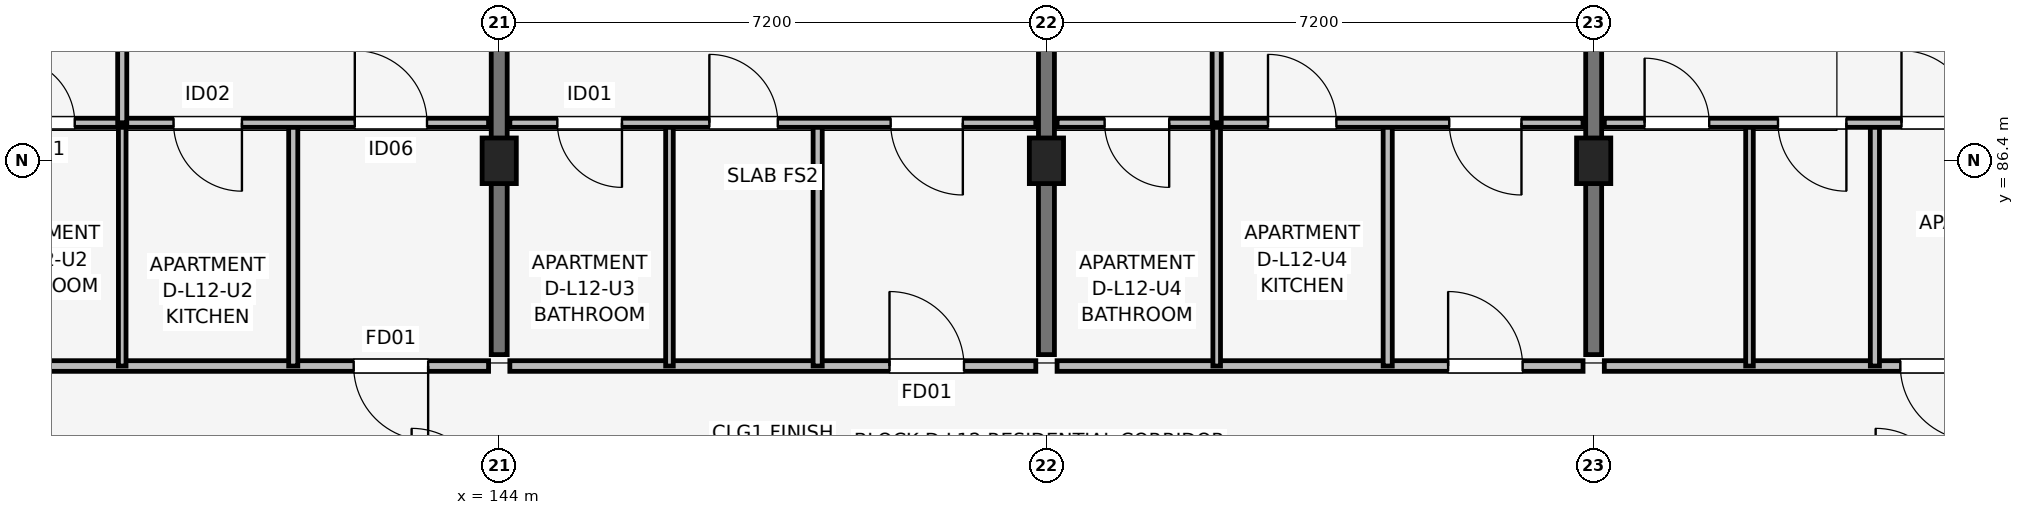
"""IFC4 building model, lengths in metres.
Left out: names, types, materials, properties, quantities, classifications, styles, units other than length and angle.
Written with IfcOpenShell. Run it as: python <this file> out.ifc"""

import sys

from ifc_helpers import new_model, si_unit, direction, frame, frame_2d, origin, origin_2d, place, context, subcontext, project, spatial, rectangle, extrude, element, fill, save


model = new_model("IFC4")
c1 = context("Model", 3, precision=1e-05, world=origin(), true_north=direction((0.0, 1.0)))
c2 = subcontext(c1, "Body", "Model", "MODEL_VIEW")
j1 = project(units=[si_unit("LENGTHUNIT", "METRE"), si_unit("PLANEANGLEUNIT", "RADIAN")], contexts=[c1])
p1 = place(None, origin())
s1 = spatial("IfcSite", under=j1, at=p1, CompositionType="ELEMENT")
p2 = place(p1, origin())
s2 = spatial("IfcBuilding", under=s1, at=p2, CompositionType="ELEMENT")
p3 = place(p2, frame((0.0, 0.0, 40.2)))
s3 = spatial("IfcBuildingStorey", under=s2, at=p3, CompositionType="ELEMENT", Elevation=40.2)
for number, where, z_axis, x_axis in (
    (1, (144.0, 86.4, 0.0), (0.0, 0.0, 1.0), (1.0, 0.0, 0.0)),
    (2, (151.2, 86.4, 0.0), (0.0, 0.0, 1.0), (1.0, 0.0, 0.0)),
    (3, (158.4, 86.4, 0.0), (0.0, 0.0, 1.0), (1.0, 0.0, 0.0)),
):
    element("IfcColumn", number, at=place(p3, frame(where, z_axis=z_axis, x_axis=x_axis)), inside=s3, PredefinedType="COLUMN", context=c2, shape_type="SweptSolid", body=[
        extrude(rectangle(XDim=0.45, YDim=0.6, at=origin_2d()), origin(), (0.0, 0.0, 1.0), 3.15),
    ])
for number, where, z_axis, x_axis in (
    (4, (144.0, 83.85, 0.0), (0.0, 0.0, 1.0), (0.0, 1.0, 0.0)),
    (5, (151.2, 83.85, 0.0), (0.0, 0.0, 1.0), (0.0, 1.0, 0.0)),
    (6, (158.4, 83.85, 0.0), (0.0, 0.0, 1.0), (0.0, 1.0, 0.0)),
):
    element("IfcWall", number, at=place(p3, frame(where, z_axis=z_axis, x_axis=x_axis)), inside=s3, PredefinedType="SHEAR", context=c2, shape_type="SweptSolid", body=[
        extrude(rectangle(XDim=9.4, YDim=0.21, at=frame_2d((4.7, 0.0))), origin(), (0.0, 0.0, 1.0), 3.15),
    ])
p4 = place(p3, frame((136.94, 83.7, 0.0), z_axis=(0.0, 0.0, 1.0), x_axis=(1.0, 0.0, 0.0)))
e7 = element("IfcWall", 7, at=p4, inside=s3, PredefinedType="PARTITIONING", context=c2, shape_type="SweptSolid", body=[
    extrude(rectangle(XDim=6.92, YDim=0.14, at=frame_2d((3.46, 0.0))), origin(), (0.0, 0.0, 1.0), 2.38),
])
p5 = place(p4, frame((6.125, 0.0, 0.0), z_axis=(0.0, 0.0, 1.0), x_axis=(-1.0, 0.0, 0.0)))
e8 = element("IfcOpeningElement", 8, at=p5, cuts=e7, PredefinedType="OPENING", context=c2, shape_type="SweptSolid", body=[
    extrude(rectangle(XDim=0.98, YDim=2.1, at=frame_2d((0.49, 1.05))), frame((0.0, 0.08, 0.0), z_axis=(0.0, -1.0, 0.0), x_axis=(1.0, 0.0, 0.0)), (0.0, 0.0, 1.0), 0.16),
])
p6 = place(p3, frame((139.04, 83.7, 0.0), z_axis=(0.0, 0.0, 1.0), x_axis=(0.0, 1.0, 0.0)))
e9 = element("IfcWall", 9, at=p6, inside=s3, PredefinedType="PARTITIONING", context=c2, shape_type="SweptSolid", body=[
    extrude(rectangle(XDim=3.2, YDim=0.1, at=frame_2d((1.6, 0.0))), origin(), (0.0, 0.0, 1.0), 2.38),
])
p7 = place(p3, frame((141.29, 83.7, 0.0), z_axis=(0.0, 0.0, 1.0), x_axis=(0.0, 1.0, 0.0)))
e10 = element("IfcWall", 10, at=p7, inside=s3, PredefinedType="PARTITIONING", context=c2, shape_type="SweptSolid", body=[
    extrude(rectangle(XDim=3.2, YDim=0.12, at=frame_2d((1.6, 0.0))), origin(), (0.0, 0.0, 1.0), 2.38),
])
p8 = place(p3, frame((136.94, 86.9, 0.0), z_axis=(0.0, 0.0, 1.0), x_axis=(1.0, 0.0, 0.0)))
e11 = element("IfcWall", 11, at=p8, inside=s3, PredefinedType="PARTITIONING", context=c2, shape_type="SweptSolid", body=[
    extrude(rectangle(XDim=6.92, YDim=0.12, at=frame_2d((3.46, 0.0))), origin(), (0.0, 0.0, 1.0), 2.38),
])
p9 = place(p8, frame((0.625, 0.0, 0.0)))
e12 = element("IfcOpeningElement", 12, at=p9, cuts=e11, PredefinedType="OPENING", context=c2, shape_type="SweptSolid", body=[
    extrude(rectangle(XDim=0.85, YDim=2.08, at=frame_2d((0.425, 1.04))), frame((0.0, 0.07, 0.0), z_axis=(0.0, -1.0, 0.0), x_axis=(1.0, 0.0, 0.0)), (0.0, 0.0, 1.0), 0.14),
])
p10 = place(p8, frame((3.675, 0.0, 0.0), z_axis=(0.0, 0.0, 1.0), x_axis=(-1.0, 0.0, 0.0)))
e13 = element("IfcOpeningElement", 13, at=p10, cuts=e11, PredefinedType="OPENING", context=c2, shape_type="SweptSolid", body=[
    extrude(rectangle(XDim=0.9, YDim=2.08, at=frame_2d((0.45, 1.04))), frame((0.0, 0.07, 0.0), z_axis=(0.0, -1.0, 0.0), x_axis=(1.0, 0.0, 0.0)), (0.0, 0.0, 1.0), 0.14),
])
p11 = place(p8, frame((5.16, 0.0, 0.0)))
e14 = element("IfcOpeningElement", 14, at=p11, cuts=e11, PredefinedType="OPENING", context=c2, shape_type="SweptSolid", body=[
    extrude(rectangle(XDim=0.95, YDim=2.08, at=frame_2d((0.475, 1.04))), frame((0.0, 0.07, 0.0), z_axis=(0.0, -1.0, 0.0), x_axis=(1.0, 0.0, 0.0)), (0.0, 0.0, 1.0), 0.14),
])
p12 = place(p3, frame((139.04, 86.9, 0.0), z_axis=(0.0, 0.0, 1.0), x_axis=(0.0, 1.0, 0.0)))
e15 = element("IfcWall", 15, at=p12, inside=s3, PredefinedType="PARTITIONING", context=c2, shape_type="SweptSolid", body=[
    extrude(rectangle(XDim=6.4, YDim=0.12, at=frame_2d((3.2, 0.0))), origin(), (0.0, 0.0, 1.0), 2.38),
])
p13 = place(p12, frame((3.65, 0.0, 0.0), z_axis=(0.0, 0.0, 1.0), x_axis=(-1.0, 0.0, 0.0)))
e16 = element("IfcOpeningElement", 16, at=p13, cuts=e15, PredefinedType="OPENING", context=c2, shape_type="SweptSolid", body=[
    extrude(rectangle(XDim=0.9, YDim=2.08, at=frame_2d((0.45, 1.04))), frame((0.0, 0.07, 0.0), z_axis=(0.0, -1.0, 0.0), x_axis=(1.0, 0.0, 0.0)), (0.0, 0.0, 1.0), 0.14),
])
p14 = place(p3, frame((144.14, 83.7, 0.0), z_axis=(0.0, 0.0, 1.0), x_axis=(1.0, 0.0, 0.0)))
e17 = element("IfcWall", 17, at=p14, inside=s3, PredefinedType="PARTITIONING", context=c2, shape_type="SweptSolid", body=[
    extrude(rectangle(XDim=6.92, YDim=0.14, at=frame_2d((3.46, 0.0))), origin(), (0.0, 0.0, 1.0), 2.38),
])
p15 = place(p14, frame((4.995, 0.0, 0.0)))
e18 = element("IfcOpeningElement", 18, at=p15, cuts=e17, PredefinedType="OPENING", context=c2, shape_type="SweptSolid", body=[
    extrude(rectangle(XDim=0.98, YDim=2.1, at=frame_2d((0.49, 1.05))), frame((0.0, 0.08, 0.0), z_axis=(0.0, -1.0, 0.0), x_axis=(1.0, 0.0, 0.0)), (0.0, 0.0, 1.0), 0.16),
])
p16 = place(p3, frame((146.24, 83.7, 0.0), z_axis=(0.0, 0.0, 1.0), x_axis=(0.0, 1.0, 0.0)))
e19 = element("IfcWall", 19, at=p16, inside=s3, PredefinedType="PARTITIONING", context=c2, shape_type="SweptSolid", body=[
    extrude(rectangle(XDim=3.2, YDim=0.1, at=frame_2d((1.6, 0.0))), origin(), (0.0, 0.0, 1.0), 2.38),
])
p17 = place(p3, frame((148.19, 83.7, 0.0), z_axis=(0.0, 0.0, 1.0), x_axis=(0.0, 1.0, 0.0)))
e20 = element("IfcWall", 20, at=p17, inside=s3, PredefinedType="PARTITIONING", context=c2, shape_type="SweptSolid", body=[
    extrude(rectangle(XDim=3.2, YDim=0.12, at=frame_2d((1.6, 0.0))), origin(), (0.0, 0.0, 1.0), 2.38),
])
p18 = place(p3, frame((144.14, 86.9, 0.0), z_axis=(0.0, 0.0, 1.0), x_axis=(1.0, 0.0, 0.0)))
e21 = element("IfcWall", 21, at=p18, inside=s3, PredefinedType="PARTITIONING", context=c2, shape_type="SweptSolid", body=[
    extrude(rectangle(XDim=6.92, YDim=0.12, at=frame_2d((3.46, 0.0))), origin(), (0.0, 0.0, 1.0), 2.38),
])
p19 = place(p18, frame((1.475, 0.0, 0.0), z_axis=(0.0, 0.0, 1.0), x_axis=(-1.0, 0.0, 0.0)))
e22 = element("IfcOpeningElement", 22, at=p19, cuts=e21, PredefinedType="OPENING", context=c2, shape_type="SweptSolid", body=[
    extrude(rectangle(XDim=0.85, YDim=2.08, at=frame_2d((0.425, 1.04))), frame((0.0, 0.07, 0.0), z_axis=(0.0, -1.0, 0.0), x_axis=(1.0, 0.0, 0.0)), (0.0, 0.0, 1.0), 0.14),
])
p20 = place(p18, frame((2.625, 0.0, 0.0)))
e23 = element("IfcOpeningElement", 23, at=p20, cuts=e21, PredefinedType="OPENING", context=c2, shape_type="SweptSolid", body=[
    extrude(rectangle(XDim=0.9, YDim=2.08, at=frame_2d((0.45, 1.04))), frame((0.0, 0.07, 0.0), z_axis=(0.0, -1.0, 0.0), x_axis=(1.0, 0.0, 0.0)), (0.0, 0.0, 1.0), 0.14),
])
p21 = place(p18, frame((5.96, 0.0, 0.0), z_axis=(0.0, 0.0, 1.0), x_axis=(-1.0, 0.0, 0.0)))
e24 = element("IfcOpeningElement", 24, at=p21, cuts=e21, PredefinedType="OPENING", context=c2, shape_type="SweptSolid", body=[
    extrude(rectangle(XDim=0.95, YDim=2.08, at=frame_2d((0.475, 1.04))), frame((0.0, 0.07, 0.0), z_axis=(0.0, -1.0, 0.0), x_axis=(1.0, 0.0, 0.0)), (0.0, 0.0, 1.0), 0.14),
])
p22 = place(p3, frame((151.34, 83.7, 0.0), z_axis=(0.0, 0.0, 1.0), x_axis=(1.0, 0.0, 0.0)))
e25 = element("IfcWall", 25, at=p22, inside=s3, PredefinedType="PARTITIONING", context=c2, shape_type="SweptSolid", body=[
    extrude(rectangle(XDim=6.92, YDim=0.14, at=frame_2d((3.46, 0.0))), origin(), (0.0, 0.0, 1.0), 2.38),
])
p23 = place(p22, frame((5.145, 0.0, 0.0)))
e26 = element("IfcOpeningElement", 26, at=p23, cuts=e25, PredefinedType="OPENING", context=c2, shape_type="SweptSolid", body=[
    extrude(rectangle(XDim=0.98, YDim=2.1, at=frame_2d((0.49, 1.05))), frame((0.0, 0.08, 0.0), z_axis=(0.0, -1.0, 0.0), x_axis=(1.0, 0.0, 0.0)), (0.0, 0.0, 1.0), 0.16),
])
p24 = place(p3, frame((153.44, 83.7, 0.0), z_axis=(0.0, 0.0, 1.0), x_axis=(0.0, 1.0, 0.0)))
e27 = element("IfcWall", 27, at=p24, inside=s3, PredefinedType="PARTITIONING", context=c2, shape_type="SweptSolid", body=[
    extrude(rectangle(XDim=3.2, YDim=0.1, at=frame_2d((1.6, 0.0))), origin(), (0.0, 0.0, 1.0), 2.38),
])
p25 = place(p3, frame((155.69, 83.7, 0.0), z_axis=(0.0, 0.0, 1.0), x_axis=(0.0, 1.0, 0.0)))
e28 = element("IfcWall", 28, at=p25, inside=s3, PredefinedType="PARTITIONING", context=c2, shape_type="SweptSolid", body=[
    extrude(rectangle(XDim=3.2, YDim=0.12, at=frame_2d((1.6, 0.0))), origin(), (0.0, 0.0, 1.0), 2.38),
])
p26 = place(p3, frame((151.34, 86.9, 0.0), z_axis=(0.0, 0.0, 1.0), x_axis=(1.0, 0.0, 0.0)))
e29 = element("IfcWall", 29, at=p26, inside=s3, PredefinedType="PARTITIONING", context=c2, shape_type="SweptSolid", body=[
    extrude(rectangle(XDim=6.92, YDim=0.12, at=frame_2d((3.46, 0.0))), origin(), (0.0, 0.0, 1.0), 2.38),
])
p27 = place(p26, frame((1.475, 0.0, 0.0), z_axis=(0.0, 0.0, 1.0), x_axis=(-1.0, 0.0, 0.0)))
e30 = element("IfcOpeningElement", 30, at=p27, cuts=e29, PredefinedType="OPENING", context=c2, shape_type="SweptSolid", body=[
    extrude(rectangle(XDim=0.85, YDim=2.08, at=frame_2d((0.425, 1.04))), frame((0.0, 0.07, 0.0), z_axis=(0.0, -1.0, 0.0), x_axis=(1.0, 0.0, 0.0)), (0.0, 0.0, 1.0), 0.14),
])
p28 = place(p26, frame((2.775, 0.0, 0.0)))
e31 = element("IfcOpeningElement", 31, at=p28, cuts=e29, PredefinedType="OPENING", context=c2, shape_type="SweptSolid", body=[
    extrude(rectangle(XDim=0.9, YDim=2.08, at=frame_2d((0.45, 1.04))), frame((0.0, 0.07, 0.0), z_axis=(0.0, -1.0, 0.0), x_axis=(1.0, 0.0, 0.0)), (0.0, 0.0, 1.0), 0.14),
])
p29 = place(p26, frame((6.11, 0.0, 0.0), z_axis=(0.0, 0.0, 1.0), x_axis=(-1.0, 0.0, 0.0)))
e32 = element("IfcOpeningElement", 32, at=p29, cuts=e29, PredefinedType="OPENING", context=c2, shape_type="SweptSolid", body=[
    extrude(rectangle(XDim=0.95, YDim=2.08, at=frame_2d((0.475, 1.04))), frame((0.0, 0.07, 0.0), z_axis=(0.0, -1.0, 0.0), x_axis=(1.0, 0.0, 0.0)), (0.0, 0.0, 1.0), 0.14),
])
p30 = place(p3, frame((153.44, 86.9, 0.0), z_axis=(0.0, 0.0, 1.0), x_axis=(0.0, 1.0, 0.0)))
e33 = element("IfcWall", 33, at=p30, inside=s3, PredefinedType="PARTITIONING", context=c2, shape_type="SweptSolid", body=[
    extrude(rectangle(XDim=6.4, YDim=0.12, at=frame_2d((3.2, 0.0))), origin(), (0.0, 0.0, 1.0), 2.38),
])
p31 = place(p30, frame((2.75, 0.0, 0.0)))
e34 = element("IfcOpeningElement", 34, at=p31, cuts=e33, PredefinedType="OPENING", context=c2, shape_type="SweptSolid", body=[
    extrude(rectangle(XDim=0.9, YDim=2.08, at=frame_2d((0.45, 1.04))), frame((0.0, 0.07, 0.0), z_axis=(0.0, -1.0, 0.0), x_axis=(1.0, 0.0, 0.0)), (0.0, 0.0, 1.0), 0.14),
])
p32 = place(p3, frame((158.54, 83.7, 0.0), z_axis=(0.0, 0.0, 1.0), x_axis=(1.0, 0.0, 0.0)))
e35 = element("IfcWall", 35, at=p32, inside=s3, PredefinedType="PARTITIONING", context=c2, shape_type="SweptSolid", body=[
    extrude(rectangle(XDim=6.92, YDim=0.14, at=frame_2d((3.46, 0.0))), origin(), (0.0, 0.0, 1.0), 2.38),
])
p33 = place(p32, frame((4.875, 0.0, 0.0), z_axis=(0.0, 0.0, 1.0), x_axis=(-1.0, 0.0, 0.0)))
e36 = element("IfcOpeningElement", 36, at=p33, cuts=e35, PredefinedType="OPENING", context=c2, shape_type="SweptSolid", body=[
    extrude(rectangle(XDim=0.98, YDim=2.1, at=frame_2d((0.49, 1.05))), frame((0.0, 0.08, 0.0), z_axis=(0.0, -1.0, 0.0), x_axis=(1.0, 0.0, 0.0)), (0.0, 0.0, 1.0), 0.16),
])
p34 = place(p3, frame((160.45, 83.7, 0.0), z_axis=(0.0, 0.0, 1.0), x_axis=(0.0, 1.0, 0.0)))
e37 = element("IfcWall", 37, at=p34, inside=s3, PredefinedType="PARTITIONING", context=c2, shape_type="SweptSolid", body=[
    extrude(rectangle(XDim=3.2, YDim=0.1, at=frame_2d((1.6, 0.0))), origin(), (0.0, 0.0, 1.0), 2.38),
])
p35 = place(p3, frame((162.1, 83.7, 0.0), z_axis=(0.0, 0.0, 1.0), x_axis=(0.0, 1.0, 0.0)))
e38 = element("IfcWall", 38, at=p35, inside=s3, PredefinedType="PARTITIONING", context=c2, shape_type="SweptSolid", body=[
    extrude(rectangle(XDim=3.2, YDim=0.12, at=frame_2d((1.6, 0.0))), origin(), (0.0, 0.0, 1.0), 2.38),
])
p36 = place(p3, frame((158.54, 86.9, 0.0), z_axis=(0.0, 0.0, 1.0), x_axis=(1.0, 0.0, 0.0)))
e39 = element("IfcWall", 39, at=p36, inside=s3, PredefinedType="PARTITIONING", context=c2, shape_type="SweptSolid", body=[
    extrude(rectangle(XDim=6.92, YDim=0.12, at=frame_2d((3.46, 0.0))), origin(), (0.0, 0.0, 1.0), 2.38),
])
p37 = place(p36, frame((0.53, 0.0, 0.0)))
e40 = element("IfcOpeningElement", 40, at=p37, cuts=e39, PredefinedType="OPENING", context=c2, shape_type="SweptSolid", body=[
    extrude(rectangle(XDim=0.85, YDim=2.08, at=frame_2d((0.425, 1.04))), frame((0.0, 0.07, 0.0), z_axis=(0.0, -1.0, 0.0), x_axis=(1.0, 0.0, 0.0)), (0.0, 0.0, 1.0), 0.14),
])
p38 = place(p36, frame((3.185, 0.0, 0.0), z_axis=(0.0, 0.0, 1.0), x_axis=(-1.0, 0.0, 0.0)))
e41 = element("IfcOpeningElement", 41, at=p38, cuts=e39, PredefinedType="OPENING", context=c2, shape_type="SweptSolid", body=[
    extrude(rectangle(XDim=0.9, YDim=2.08, at=frame_2d((0.45, 1.04))), frame((0.0, 0.07, 0.0), z_axis=(0.0, -1.0, 0.0), x_axis=(1.0, 0.0, 0.0)), (0.0, 0.0, 1.0), 0.14),
])
p39 = place(p36, frame((3.91, 0.0, 0.0)))
e42 = element("IfcOpeningElement", 42, at=p39, cuts=e39, PredefinedType="OPENING", context=c2, shape_type="SweptSolid", body=[
    extrude(rectangle(XDim=0.95, YDim=2.08, at=frame_2d((0.475, 1.04))), frame((0.0, 0.07, 0.0), z_axis=(0.0, -1.0, 0.0), x_axis=(1.0, 0.0, 0.0)), (0.0, 0.0, 1.0), 0.14),
])
p40 = place(p5, origin())
e43 = element("IfcDoor", 43, at=p40, inside=s3, OperationType="SINGLE_SWING_RIGHT", PredefinedType="DOOR", context=c2, shape_type="SweptSolid", body=[
    extrude(rectangle(XDim=0.98, YDim=2.1, at=frame_2d((0.49, 1.05))), frame((0.0, 0.025, 0.0), z_axis=(0.0, -1.0, 0.0), x_axis=(1.0, 0.0, 0.0)), (0.0, 0.0, 1.0), 0.05),
])
fill(e8, e43)
p41 = place(p9, origin())
e44 = element("IfcDoor", 44, at=p41, inside=s3, OperationType="SINGLE_SWING_LEFT", PredefinedType="DOOR", context=c2, shape_type="SweptSolid", body=[
    extrude(rectangle(XDim=0.85, YDim=2.08, at=frame_2d((0.425, 1.04))), frame((0.0, 0.025, 0.0), z_axis=(0.0, -1.0, 0.0), x_axis=(1.0, 0.0, 0.0)), (0.0, 0.0, 1.0), 0.05),
])
fill(e12, e44)
p42 = place(p10, origin())
e45 = element("IfcDoor", 45, at=p42, inside=s3, OperationType="SINGLE_SWING_RIGHT", PredefinedType="DOOR", context=c2, shape_type="SweptSolid", body=[
    extrude(rectangle(XDim=0.9, YDim=2.08, at=frame_2d((0.45, 1.04))), frame((0.0, 0.025, 0.0), z_axis=(0.0, -1.0, 0.0), x_axis=(1.0, 0.0, 0.0)), (0.0, 0.0, 1.0), 0.05),
])
fill(e13, e45)
p43 = place(p11, origin())
e46 = element("IfcDoor", 46, at=p43, inside=s3, OperationType="SINGLE_SWING_LEFT", PredefinedType="DOOR", context=c2, shape_type="SweptSolid", body=[
    extrude(rectangle(XDim=0.95, YDim=2.08, at=frame_2d((0.475, 1.04))), frame((0.0, 0.025, 0.0), z_axis=(0.0, -1.0, 0.0), x_axis=(1.0, 0.0, 0.0)), (0.0, 0.0, 1.0), 0.05),
])
fill(e14, e46)
p44 = place(p15, origin())
e47 = element("IfcDoor", 47, at=p44, inside=s3, OperationType="SINGLE_SWING_LEFT", PredefinedType="DOOR", context=c2, shape_type="SweptSolid", body=[
    extrude(rectangle(XDim=0.98, YDim=2.1, at=frame_2d((0.49, 1.05))), frame((0.0, 0.025, 0.0), z_axis=(0.0, -1.0, 0.0), x_axis=(1.0, 0.0, 0.0)), (0.0, 0.0, 1.0), 0.05),
])
fill(e18, e47)
p45 = place(p19, origin())
e48 = element("IfcDoor", 48, at=p45, inside=s3, OperationType="SINGLE_SWING_RIGHT", PredefinedType="DOOR", context=c2, shape_type="SweptSolid", body=[
    extrude(rectangle(XDim=0.85, YDim=2.08, at=frame_2d((0.425, 1.04))), frame((0.0, 0.025, 0.0), z_axis=(0.0, -1.0, 0.0), x_axis=(1.0, 0.0, 0.0)), (0.0, 0.0, 1.0), 0.05),
])
fill(e22, e48)
p46 = place(p20, origin())
e49 = element("IfcDoor", 49, at=p46, inside=s3, OperationType="SINGLE_SWING_LEFT", PredefinedType="DOOR", context=c2, shape_type="SweptSolid", body=[
    extrude(rectangle(XDim=0.9, YDim=2.08, at=frame_2d((0.45, 1.04))), frame((0.0, 0.025, 0.0), z_axis=(0.0, -1.0, 0.0), x_axis=(1.0, 0.0, 0.0)), (0.0, 0.0, 1.0), 0.05),
])
fill(e23, e49)
p47 = place(p21, origin())
e50 = element("IfcDoor", 50, at=p47, inside=s3, OperationType="SINGLE_SWING_RIGHT", PredefinedType="DOOR", context=c2, shape_type="SweptSolid", body=[
    extrude(rectangle(XDim=0.95, YDim=2.08, at=frame_2d((0.475, 1.04))), frame((0.0, 0.025, 0.0), z_axis=(0.0, -1.0, 0.0), x_axis=(1.0, 0.0, 0.0)), (0.0, 0.0, 1.0), 0.05),
])
fill(e24, e50)
p48 = place(p23, origin())
e51 = element("IfcDoor", 51, at=p48, inside=s3, OperationType="SINGLE_SWING_LEFT", PredefinedType="DOOR", context=c2, shape_type="SweptSolid", body=[
    extrude(rectangle(XDim=0.98, YDim=2.1, at=frame_2d((0.49, 1.05))), frame((0.0, 0.025, 0.0), z_axis=(0.0, -1.0, 0.0), x_axis=(1.0, 0.0, 0.0)), (0.0, 0.0, 1.0), 0.05),
])
fill(e26, e51)
p49 = place(p27, origin())
e52 = element("IfcDoor", 52, at=p49, inside=s3, OperationType="SINGLE_SWING_RIGHT", PredefinedType="DOOR", context=c2, shape_type="SweptSolid", body=[
    extrude(rectangle(XDim=0.85, YDim=2.08, at=frame_2d((0.425, 1.04))), frame((0.0, 0.025, 0.0), z_axis=(0.0, -1.0, 0.0), x_axis=(1.0, 0.0, 0.0)), (0.0, 0.0, 1.0), 0.05),
])
fill(e30, e52)
p50 = place(p28, origin())
e53 = element("IfcDoor", 53, at=p50, inside=s3, OperationType="SINGLE_SWING_LEFT", PredefinedType="DOOR", context=c2, shape_type="SweptSolid", body=[
    extrude(rectangle(XDim=0.9, YDim=2.08, at=frame_2d((0.45, 1.04))), frame((0.0, 0.025, 0.0), z_axis=(0.0, -1.0, 0.0), x_axis=(1.0, 0.0, 0.0)), (0.0, 0.0, 1.0), 0.05),
])
fill(e31, e53)
p51 = place(p29, origin())
e54 = element("IfcDoor", 54, at=p51, inside=s3, OperationType="SINGLE_SWING_RIGHT", PredefinedType="DOOR", context=c2, shape_type="SweptSolid", body=[
    extrude(rectangle(XDim=0.95, YDim=2.08, at=frame_2d((0.475, 1.04))), frame((0.0, 0.025, 0.0), z_axis=(0.0, -1.0, 0.0), x_axis=(1.0, 0.0, 0.0)), (0.0, 0.0, 1.0), 0.05),
])
fill(e32, e54)
p52 = place(p33, origin())
e55 = element("IfcDoor", 55, at=p52, inside=s3, OperationType="SINGLE_SWING_RIGHT", PredefinedType="DOOR", context=c2, shape_type="SweptSolid", body=[
    extrude(rectangle(XDim=0.98, YDim=2.1, at=frame_2d((0.49, 1.05))), frame((0.0, 0.025, 0.0), z_axis=(0.0, -1.0, 0.0), x_axis=(1.0, 0.0, 0.0)), (0.0, 0.0, 1.0), 0.05),
])
fill(e36, e55)
p53 = place(p37, origin())
e56 = element("IfcDoor", 56, at=p53, inside=s3, OperationType="SINGLE_SWING_LEFT", PredefinedType="DOOR", context=c2, shape_type="SweptSolid", body=[
    extrude(rectangle(XDim=0.85, YDim=2.08, at=frame_2d((0.425, 1.04))), frame((0.0, 0.025, 0.0), z_axis=(0.0, -1.0, 0.0), x_axis=(1.0, 0.0, 0.0)), (0.0, 0.0, 1.0), 0.05),
])
fill(e40, e56)
p54 = place(p38, origin())
e57 = element("IfcDoor", 57, at=p54, inside=s3, OperationType="SINGLE_SWING_RIGHT", PredefinedType="DOOR", context=c2, shape_type="SweptSolid", body=[
    extrude(rectangle(XDim=0.9, YDim=2.08, at=frame_2d((0.45, 1.04))), frame((0.0, 0.025, 0.0), z_axis=(0.0, -1.0, 0.0), x_axis=(1.0, 0.0, 0.0)), (0.0, 0.0, 1.0), 0.05),
])
fill(e41, e57)
p55 = place(p39, origin())
e58 = element("IfcDoor", 58, at=p55, inside=s3, OperationType="SINGLE_SWING_LEFT", PredefinedType="DOOR", context=c2, shape_type="SweptSolid", body=[
    extrude(rectangle(XDim=0.95, YDim=2.08, at=frame_2d((0.475, 1.04))), frame((0.0, 0.025, 0.0), z_axis=(0.0, -1.0, 0.0), x_axis=(1.0, 0.0, 0.0)), (0.0, 0.0, 1.0), 0.05),
])
fill(e42, e58)
save(model, sys.argv[1])
